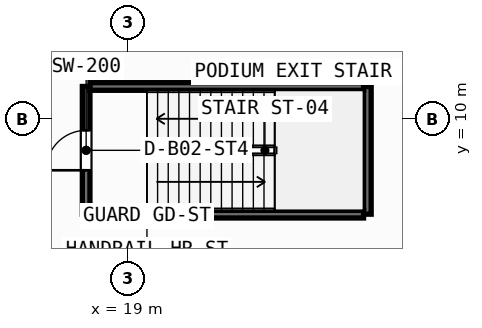
"""IFC4 building model, lengths in metres.
Left out: names, types, materials, properties, quantities, classifications, styles, units other than length and angle.
Written with IfcOpenShell. Run it as: python <this file> out.ifc"""

import sys

from ifc_helpers import new_model, si_unit, direction, frame, frame_2d, origin, place, context, subcontext, project, spatial, rectangle, extrude, source, transform, mapped, element, fill, save


model = new_model("IFC4")
c1 = context("Model", 3, precision=1e-05, world=origin(), true_north=direction((0.0, 1.0)))
c2 = subcontext(c1, "Body", "Model", "MODEL_VIEW")
j1 = project(units=[si_unit("LENGTHUNIT", "METRE"), si_unit("PLANEANGLEUNIT", "RADIAN")], contexts=[c1])
p1 = place(None, origin())
s1 = spatial("IfcSite", under=j1, at=p1, CompositionType="ELEMENT")
p2 = place(p1, origin())
s2 = spatial("IfcBuilding", under=s1, at=p2, CompositionType="ELEMENT")
p3 = place(p2, frame((0.0, 0.0, -9.0)))
s3 = spatial("IfcBuildingStorey", under=s2, at=p3, CompositionType="ELEMENT", Elevation=-9.0)
p4 = place(p3, frame((17.9, 7.5, 0.0), z_axis=(0.0, 0.0, 1.0), x_axis=(0.0, 1.0, 0.0)))
e1 = element("IfcWall", 1, at=p4, inside=s3, PredefinedType="SHEAR", context=c2, shape_type="SweptSolid", body=[
    extrude(rectangle(XDim=3.36, YDim=0.2, at=frame_2d((1.68, 0.0))), origin(), (0.0, 0.0, 1.0), 4.22),
])
p5 = place(p4, frame((1.155, 0.0, 0.0)))
e2 = element("IfcOpeningElement", 2, at=p5, cuts=e1, PredefinedType="OPENING", context=c2, shape_type="SweptSolid", body=[
    extrude(rectangle(XDim=1.05, YDim=2.15, at=frame_2d((0.525, 1.075))), frame((0.0, 0.11, 0.0), z_axis=(0.0, -1.0, 0.0), x_axis=(1.0, 0.0, 0.0)), (0.0, 0.0, 1.0), 0.22),
])
p6 = place(p3, frame((25.3, 10.86, 0.0), z_axis=(0.0, 0.0, 1.0), x_axis=(0.0, -1.0, 0.0)))
e3 = element("IfcWall", 3, at=p6, inside=s3, PredefinedType="SHEAR", context=c2, shape_type="SweptSolid", body=[
    extrude(rectangle(XDim=3.36, YDim=0.2, at=frame_2d((1.68, 0.0))), origin(), (0.0, 0.0, 1.0), 4.22),
])
for number, where, z_axis, x_axis in (
    (4, (25.2, 7.5, 0.0), (0.0, 0.0, 1.0), (-1.0, 0.0, 0.0)),
    (5, (18.0, 10.86, 0.0), (0.0, 0.0, 1.0), (1.0, 0.0, 0.0)),
):
    element("IfcWall", number, at=place(p3, frame(where, z_axis=z_axis, x_axis=x_axis)), inside=s3, PredefinedType="SHEAR", context=c2, shape_type="SweptSolid", body=[
        extrude(rectangle(XDim=7.2, YDim=0.2, at=frame_2d((3.6, 0.0))), origin(), (0.0, 0.0, 1.0), 4.22),
    ])
m1 = source(origin(), c2, "Body", "SweptSolid", [
    extrude(rectangle(XDim=1.05, YDim=2.15, at=frame_2d((0.525, 1.075))), frame((0.0, 0.025, 0.0), z_axis=(0.0, -1.0, 0.0), x_axis=(1.0, 0.0, 0.0)), (0.0, 0.0, 1.0), 0.05),
])
p7 = place(p5, origin())
e6 = element("IfcDoor", 6, at=p7, inside=s3, OperationType="SINGLE_SWING_LEFT", PredefinedType="DOOR", context=c2, shape_type="MappedRepresentation", body=[
    mapped(m1, transform((0.0, 0.0, 0.0), scale=1.0)),
])
fill(e2, e6)
save(model, sys.argv[1])
